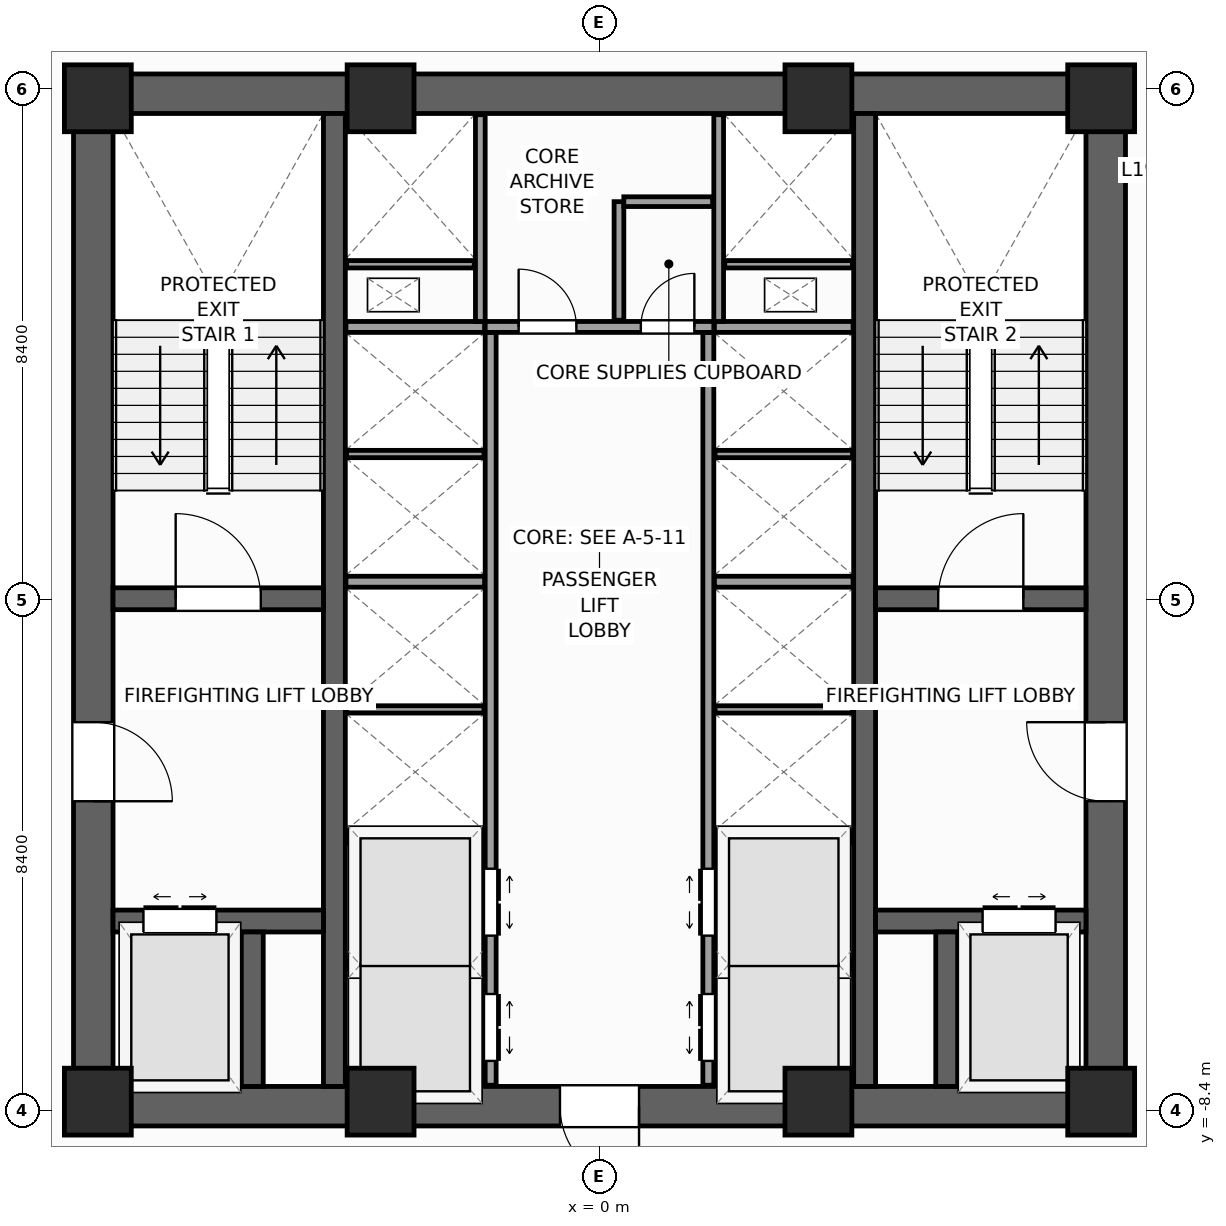
"""IFC4 building model, lengths in metres.
Left out: names, types, materials, properties, quantities, classifications, styles, units other than length and angle.
Written with IfcOpenShell. Run it as: python <this file> out.ifc"""

import sys

from ifc_helpers import new_model, si_unit, direction, frame, frame_2d, origin, origin_2d, place, context, subcontext, project, spatial, rectangle, extrude, source, transform, mapped, element, fill, save


model = new_model("IFC4")
c1 = context("Model", 3, precision=1e-05, world=origin(), true_north=direction((0.0, 1.0)))
c2 = subcontext(c1, "Body", "Model", "MODEL_VIEW")
j1 = project(units=[si_unit("LENGTHUNIT", "METRE"), si_unit("PLANEANGLEUNIT", "RADIAN")], contexts=[c1])
p1 = place(None, origin())
s1 = spatial("IfcSite", under=j1, at=p1, CompositionType="ELEMENT")
p2 = place(p1, origin())
s2 = spatial("IfcBuilding", under=s1, at=p2, CompositionType="ELEMENT")
p3 = place(p2, frame((0.0, 0.0, 83.2)))
s3 = spatial("IfcBuildingStorey", under=s2, at=p3, CompositionType="ELEMENT", Elevation=83.2)
p4 = place(p3, frame((-8.65, -8.325, 0.0), z_axis=(0.0, 0.0, 1.0), x_axis=(1.0, 0.0, 0.0)))
e1 = element("IfcWall", 1, at=p4, inside=s3, PredefinedType="SHEAR", context=c2, shape_type="SweptSolid", body=[
    extrude(rectangle(XDim=17.3, YDim=0.65, at=frame_2d((8.65, 0.0))), origin(), (0.0, 0.0, 1.0), 4.0),
])
p5 = place(p4, frame((8.0, 0.0, 0.0)))
e2 = element("IfcOpeningElement", 2, at=p5, cuts=e1, PredefinedType="OPENING", context=c2, shape_type="SweptSolid", body=[
    extrude(rectangle(XDim=1.3, YDim=2.2, at=frame_2d((0.65, 1.1))), frame((0.0, 0.335, 0.0), z_axis=(0.0, -1.0, 0.0), x_axis=(1.0, 0.0, 0.0)), (0.0, 0.0, 1.0), 0.67),
])
p6 = place(p3, frame((-8.65, 8.325, 0.0), z_axis=(0.0, 0.0, 1.0), x_axis=(1.0, 0.0, 0.0)))
e3 = element("IfcWall", 3, at=p6, inside=s3, PredefinedType="SHEAR", context=c2, shape_type="SweptSolid", body=[
    extrude(rectangle(XDim=17.3, YDim=0.65, at=frame_2d((8.65, 0.0))), origin(), (0.0, 0.0, 1.0), 4.0),
])
p7 = place(p3, frame((-8.325, -8.0, 0.0), z_axis=(0.0, 0.0, 1.0), x_axis=(0.0, 1.0, 0.0)))
e4 = element("IfcWall", 4, at=p7, inside=s3, PredefinedType="SHEAR", context=c2, shape_type="SweptSolid", body=[
    extrude(rectangle(XDim=16.0, YDim=0.65, at=frame_2d((8.0, 0.0))), origin(), (0.0, 0.0, 1.0), 4.0),
])
p8 = place(p7, frame((4.69, 0.0, 0.0)))
e5 = element("IfcOpeningElement", 5, at=p8, cuts=e4, PredefinedType="OPENING", context=c2, shape_type="SweptSolid", body=[
    extrude(rectangle(XDim=1.3, YDim=2.2, at=frame_2d((0.65, 1.1))), frame((0.0, 0.335, 0.0), z_axis=(0.0, -1.0, 0.0), x_axis=(1.0, 0.0, 0.0)), (0.0, 0.0, 1.0), 0.67),
])
p9 = place(p3, frame((8.325, -8.0, 0.0), z_axis=(0.0, 0.0, 1.0), x_axis=(0.0, 1.0, 0.0)))
e6 = element("IfcWall", 6, at=p9, inside=s3, PredefinedType="SHEAR", context=c2, shape_type="SweptSolid", body=[
    extrude(rectangle(XDim=16.0, YDim=0.65, at=frame_2d((8.0, 0.0))), origin(), (0.0, 0.0, 1.0), 4.0),
])
p10 = place(p9, frame((4.69, 0.0, 0.0)))
e7 = element("IfcOpeningElement", 7, at=p10, cuts=e6, PredefinedType="OPENING", context=c2, shape_type="SweptSolid", body=[
    extrude(rectangle(XDim=1.3, YDim=2.2, at=frame_2d((0.65, 1.1))), frame((0.0, 0.335, 0.0), z_axis=(0.0, -1.0, 0.0), x_axis=(1.0, 0.0, 0.0)), (0.0, 0.0, 1.0), 0.67),
])
for number, where, z_axis, x_axis in (
    (8, (-4.36, -8.0, 0.0), (0.0, 0.0, 1.0), (0.0, 1.0, 0.0)),
    (9, (4.36, -8.0, 0.0), (0.0, 0.0, 1.0), (0.0, 1.0, 0.0)),
):
    element("IfcWall", number, at=place(p3, frame(where, z_axis=z_axis, x_axis=x_axis)), inside=s3, PredefinedType="SHEAR", context=c2, shape_type="SweptSolid", body=[
        extrude(rectangle(XDim=16.0, YDim=0.36, at=frame_2d((8.0, 0.0))), origin(), (0.0, 0.0, 1.0), 4.0),
    ])
p11 = place(p3, frame((-8.0, 0.02, 0.0), z_axis=(0.0, 0.0, 1.0), x_axis=(1.0, 0.0, 0.0)))
e10 = element("IfcWall", 10, at=p11, inside=s3, PredefinedType="SHEAR", context=c2, shape_type="SweptSolid", body=[
    extrude(rectangle(XDim=3.46, YDim=0.36, at=frame_2d((1.73, 0.0))), origin(), (0.0, 0.0, 1.0), 4.0),
])
p12 = place(p11, frame((1.03, 0.0, 0.0)))
e11 = element("IfcOpeningElement", 11, at=p12, cuts=e10, PredefinedType="OPENING", context=c2, shape_type="SweptSolid", body=[
    extrude(rectangle(XDim=1.4, YDim=2.2, at=frame_2d((0.7, 1.1))), frame((0.0, 0.19, 0.0), z_axis=(0.0, -1.0, 0.0), x_axis=(1.0, 0.0, 0.0)), (0.0, 0.0, 1.0), 0.38),
])
p13 = place(p3, frame((4.54, 0.02, 0.0), z_axis=(0.0, 0.0, 1.0), x_axis=(1.0, 0.0, 0.0)))
e12 = element("IfcWall", 12, at=p13, inside=s3, PredefinedType="SHEAR", context=c2, shape_type="SweptSolid", body=[
    extrude(rectangle(XDim=3.46, YDim=0.36, at=frame_2d((1.73, 0.0))), origin(), (0.0, 0.0, 1.0), 4.0),
])
p14 = place(p13, frame((1.03, 0.0, 0.0)))
e13 = element("IfcOpeningElement", 13, at=p14, cuts=e12, PredefinedType="OPENING", context=c2, shape_type="SweptSolid", body=[
    extrude(rectangle(XDim=1.4, YDim=2.2, at=frame_2d((0.7, 1.1))), frame((0.0, 0.19, 0.0), z_axis=(0.0, -1.0, 0.0), x_axis=(1.0, 0.0, 0.0)), (0.0, 0.0, 1.0), 0.38),
])
p15 = place(p3, frame((-8.0, -5.28, 0.0), z_axis=(0.0, 0.0, 1.0), x_axis=(1.0, 0.0, 0.0)))
e14 = element("IfcWall", 14, at=p15, inside=s3, PredefinedType="SHEAR", context=c2, shape_type="SweptSolid", body=[
    extrude(rectangle(XDim=3.46, YDim=0.36, at=frame_2d((1.73, 0.0))), origin(), (0.0, 0.0, 1.0), 4.0),
])
p16 = place(p15, frame((0.5, 0.0, 0.0)))
e15 = element("IfcOpeningElement", 15, at=p16, cuts=e14, PredefinedType="OPENING", context=c2, shape_type="SweptSolid", body=[
    extrude(rectangle(XDim=1.2, YDim=2.25, at=frame_2d((0.6, 1.125))), frame((0.0, 0.19, 0.0), z_axis=(0.0, -1.0, 0.0), x_axis=(1.0, 0.0, 0.0)), (0.0, 0.0, 1.0), 0.38),
])
p17 = place(p3, frame((4.54, -5.28, 0.0), z_axis=(0.0, 0.0, 1.0), x_axis=(1.0, 0.0, 0.0)))
e16 = element("IfcWall", 16, at=p17, inside=s3, PredefinedType="SHEAR", context=c2, shape_type="SweptSolid", body=[
    extrude(rectangle(XDim=3.46, YDim=0.36, at=frame_2d((1.73, 0.0))), origin(), (0.0, 0.0, 1.0), 4.0),
])
p18 = place(p17, frame((1.76, 0.0, 0.0)))
e17 = element("IfcOpeningElement", 17, at=p18, cuts=e16, PredefinedType="OPENING", context=c2, shape_type="SweptSolid", body=[
    extrude(rectangle(XDim=1.2, YDim=2.25, at=frame_2d((0.6, 1.125))), frame((0.0, 0.19, 0.0), z_axis=(0.0, -1.0, 0.0), x_axis=(1.0, 0.0, 0.0)), (0.0, 0.0, 1.0), 0.38),
])
for number, where, z_axis, x_axis in (
    (18, (-5.71, -8.0, 0.0), (0.0, 0.0, 1.0), (0.0, 1.0, 0.0)),
    (19, (5.71, -8.0, 0.0), (0.0, 0.0, 1.0), (0.0, 1.0, 0.0)),
):
    element("IfcWall", number, at=place(p3, frame(where, z_axis=z_axis, x_axis=x_axis)), inside=s3, PredefinedType="SHEAR", context=c2, shape_type="SweptSolid", body=[
        extrude(rectangle(XDim=2.54, YDim=0.36, at=frame_2d((1.27, 0.0))), origin(), (0.0, 0.0, 1.0), 4.0),
    ])
m1 = source(origin(), c2, "Body", "SweptSolid", [
    extrude(rectangle(XDim=1.1, YDim=1.1, at=origin_2d()), origin(), (0.0, 0.0, 1.0), 4.0),
])
for number, where, z_axis, x_axis in (
    (20, (-8.25, -8.25, 0.0), (0.0, 0.0, 1.0), (1.0, 0.0, 0.0)),
    (21, (8.25, -8.25, 0.0), (0.0, 0.0, 1.0), (1.0, 0.0, 0.0)),
    (22, (8.25, 8.25, 0.0), (0.0, 0.0, 1.0), (1.0, 0.0, 0.0)),
    (23, (-8.25, 8.25, 0.0), (0.0, 0.0, 1.0), (1.0, 0.0, 0.0)),
    (24, (-3.6, -8.25, 0.0), (0.0, 0.0, 1.0), (1.0, 0.0, 0.0)),
    (25, (3.6, -8.25, 0.0), (0.0, 0.0, 1.0), (1.0, 0.0, 0.0)),
    (26, (-3.6, 8.25, 0.0), (0.0, 0.0, 1.0), (1.0, 0.0, 0.0)),
    (27, (3.6, 8.25, 0.0), (0.0, 0.0, 1.0), (1.0, 0.0, 0.0)),
):
    element("IfcColumn", number, at=place(p3, frame(where, z_axis=z_axis, x_axis=x_axis)), inside=s3, PredefinedType="PILASTER", context=c2, shape_type="MappedRepresentation", body=[
        mapped(m1, transform((0.0, 0.0, 0.0), scale=1.0)),
    ])
p19 = place(p3, frame((-1.79, -7.98, 0.0), z_axis=(0.0, 0.0, 1.0), x_axis=(0.0, 1.0, 0.0)))
e28 = element("IfcWall", 28, at=p19, inside=s3, PredefinedType="PARTITIONING", context=c2, shape_type="SweptSolid", body=[
    extrude(rectangle(XDim=12.38, YDim=0.18, at=frame_2d((6.19, 0.0))), origin(), (0.0, 0.0, 1.0), 3.74),
])
p20 = place(p19, frame((0.4, 0.0, 0.0)))
e29 = element("IfcOpeningElement", 29, at=p20, cuts=e28, PredefinedType="OPENING", context=c2, shape_type="SweptSolid", body=[
    extrude(rectangle(XDim=1.1, YDim=2.2, at=frame_2d((0.55, 1.1))), frame((0.0, 0.1, 0.0), z_axis=(0.0, -1.0, 0.0), x_axis=(1.0, 0.0, 0.0)), (0.0, 0.0, 1.0), 0.2),
])
p21 = place(p19, frame((2.46, 0.0, 0.0)))
e30 = element("IfcOpeningElement", 30, at=p21, cuts=e28, PredefinedType="OPENING", context=c2, shape_type="SweptSolid", body=[
    extrude(rectangle(XDim=1.1, YDim=2.2, at=frame_2d((0.55, 1.1))), frame((0.0, 0.1, 0.0), z_axis=(0.0, -1.0, 0.0), x_axis=(1.0, 0.0, 0.0)), (0.0, 0.0, 1.0), 0.2),
])
p22 = place(p3, frame((1.79, -7.98, 0.0), z_axis=(0.0, 0.0, 1.0), x_axis=(0.0, 1.0, 0.0)))
e31 = element("IfcWall", 31, at=p22, inside=s3, PredefinedType="PARTITIONING", context=c2, shape_type="SweptSolid", body=[
    extrude(rectangle(XDim=12.38, YDim=0.18, at=frame_2d((6.19, 0.0))), origin(), (0.0, 0.0, 1.0), 3.74),
])
p23 = place(p22, frame((0.4, 0.0, 0.0)))
e32 = element("IfcOpeningElement", 32, at=p23, cuts=e31, PredefinedType="OPENING", context=c2, shape_type="SweptSolid", body=[
    extrude(rectangle(XDim=1.1, YDim=2.2, at=frame_2d((0.55, 1.1))), frame((0.0, 0.1, 0.0), z_axis=(0.0, -1.0, 0.0), x_axis=(1.0, 0.0, 0.0)), (0.0, 0.0, 1.0), 0.2),
])
p24 = place(p22, frame((2.46, 0.0, 0.0)))
e33 = element("IfcOpeningElement", 33, at=p24, cuts=e31, PredefinedType="OPENING", context=c2, shape_type="SweptSolid", body=[
    extrude(rectangle(XDim=1.1, YDim=2.2, at=frame_2d((0.55, 1.1))), frame((0.0, 0.1, 0.0), z_axis=(0.0, -1.0, 0.0), x_axis=(1.0, 0.0, 0.0)), (0.0, 0.0, 1.0), 0.2),
])
p25 = place(p3, frame((-1.88, 4.49, 0.0), z_axis=(0.0, 0.0, 1.0), x_axis=(1.0, 0.0, 0.0)))
e34 = element("IfcWall", 34, at=p25, inside=s3, PredefinedType="PARTITIONING", context=c2, shape_type="SweptSolid", body=[
    extrude(rectangle(XDim=3.76, YDim=0.18, at=frame_2d((1.88, 0.0))), origin(), (0.0, 0.0, 1.0), 3.74),
])
p26 = place(p25, frame((0.55, 0.0, 0.0)))
e35 = element("IfcOpeningElement", 35, at=p26, cuts=e34, PredefinedType="OPENING", context=c2, shape_type="SweptSolid", body=[
    extrude(rectangle(XDim=0.95, YDim=2.1, at=frame_2d((0.475, 1.05))), frame((0.0, 0.1, 0.0), z_axis=(0.0, -1.0, 0.0), x_axis=(1.0, 0.0, 0.0)), (0.0, 0.0, 1.0), 0.2),
])
p27 = place(p25, frame((2.56, 0.0, 0.0)))
e36 = element("IfcOpeningElement", 36, at=p27, cuts=e34, PredefinedType="OPENING", context=c2, shape_type="SweptSolid", body=[
    extrude(rectangle(XDim=0.88, YDim=2.1, at=frame_2d((0.44, 1.05))), frame((0.0, 0.1, 0.0), z_axis=(0.0, -1.0, 0.0), x_axis=(1.0, 0.0, 0.0)), (0.0, 0.0, 1.0), 0.2),
])
for number, where, z_axis, x_axis in (
    (37, (-4.17, -3.9, 0.0), (0.0, 0.0, 1.0), (1.0, 0.0, 0.0)),
    (38, (1.89, -3.9, 0.0), (0.0, 0.0, 1.0), (1.0, 0.0, 0.0)),
    (39, (-4.17, 0.3, 0.0), (0.0, 0.0, 1.0), (1.0, 0.0, 0.0)),
    (40, (1.89, 0.3, 0.0), (0.0, 0.0, 1.0), (1.0, 0.0, 0.0)),
    (41, (-4.17, 4.49, 0.0), (0.0, 0.0, 1.0), (1.0, 0.0, 0.0)),
    (42, (1.89, 4.49, 0.0), (0.0, 0.0, 1.0), (1.0, 0.0, 0.0)),
):
    element("IfcWall", number, at=place(p3, frame(where, z_axis=z_axis, x_axis=x_axis)), inside=s3, PredefinedType="PARTITIONING", context=c2, shape_type="SweptSolid", body=[
        extrude(rectangle(XDim=2.28, YDim=0.18, at=frame_2d((1.14, 0.0))), origin(), (0.0, 0.0, 1.0), 3.74),
    ])
for number, where, z_axis, x_axis in (
    (43, (-4.16, -6.0, 0.0), (0.0, 0.0, 1.0), (1.0, 0.0, 0.0)),
    (44, (1.9, -6.0, 0.0), (0.0, 0.0, 1.0), (1.0, 0.0, 0.0)),
    (45, (-4.16, -1.8, 0.0), (0.0, 0.0, 1.0), (1.0, 0.0, 0.0)),
    (46, (1.9, -1.8, 0.0), (0.0, 0.0, 1.0), (1.0, 0.0, 0.0)),
    (47, (-4.16, 2.4, 0.0), (0.0, 0.0, 1.0), (1.0, 0.0, 0.0)),
    (48, (1.9, 2.4, 0.0), (0.0, 0.0, 1.0), (1.0, 0.0, 0.0)),
):
    element("IfcWall", number, at=place(p3, frame(where, z_axis=z_axis, x_axis=x_axis)), inside=s3, PredefinedType="PARTITIONING", context=c2, shape_type="SweptSolid", body=[
        extrude(rectangle(XDim=2.26, YDim=0.12, at=frame_2d((1.13, 0.0))), origin(), (0.0, 0.0, 1.0), 3.74),
    ])
for number, where, z_axis, x_axis in (
    (49, (-1.96, 4.58, 0.0), (0.0, 0.0, 1.0), (0.0, 1.0, 0.0)),
    (50, (1.96, 4.58, 0.0), (0.0, 0.0, 1.0), (0.0, 1.0, 0.0)),
):
    element("IfcWall", number, at=place(p3, frame(where, z_axis=z_axis, x_axis=x_axis)), inside=s3, PredefinedType="PARTITIONING", context=c2, shape_type="SweptSolid", body=[
        extrude(rectangle(XDim=3.4, YDim=0.16, at=frame_2d((1.7, 0.0))), origin(), (0.0, 0.0, 1.0), 3.74),
    ])
for number, where, z_axis, x_axis in (
    (51, (-4.16, 5.52, 0.0), (0.0, 0.0, 1.0), (1.0, 0.0, 0.0)),
    (52, (2.06, 5.52, 0.0), (0.0, 0.0, 1.0), (1.0, 0.0, 0.0)),
):
    element("IfcWall", number, at=place(p3, frame(where, z_axis=z_axis, x_axis=x_axis)), inside=s3, PredefinedType="PARTITIONING", context=c2, shape_type="SweptSolid", body=[
        extrude(rectangle(XDim=2.1, YDim=0.12, at=frame_2d((1.05, 0.0))), origin(), (0.0, 0.0, 1.0), 3.74),
    ])
p28 = place(p3, frame((0.32, 4.6, 0.0), z_axis=(0.0, 0.0, 1.0), x_axis=(0.0, 1.0, 0.0)))
e53 = element("IfcWall", 53, at=p28, inside=s3, PredefinedType="PARTITIONING", context=c2, shape_type="SweptSolid", body=[
    extrude(rectangle(XDim=1.95, YDim=0.16, at=frame_2d((0.975, 0.0))), origin(), (0.0, 0.0, 1.0), 3.74),
])
p29 = place(p3, frame((0.4, 6.55, 0.0), z_axis=(0.0, 0.0, 1.0), x_axis=(1.0, 0.0, 0.0)))
e54 = element("IfcWall", 54, at=p29, inside=s3, PredefinedType="PARTITIONING", context=c2, shape_type="SweptSolid", body=[
    extrude(rectangle(XDim=1.46, YDim=0.16, at=frame_2d((0.73, 0.0))), origin(), (0.0, 0.0, 1.0), 3.74),
])
m2 = source(origin(), c2, "Body", "SweptSolid", [
    extrude(rectangle(XDim=1.4, YDim=2.2, at=frame_2d((0.7, 1.1))), frame((0.0, 0.025, 0.0), z_axis=(0.0, -1.0, 0.0), x_axis=(1.0, 0.0, 0.0)), (0.0, 0.0, 1.0), 0.05),
])
p30 = place(p12, origin())
e55 = element("IfcDoor", 55, at=p30, inside=s3, OperationType="SINGLE_SWING_LEFT", PredefinedType="DOOR", context=c2, shape_type="MappedRepresentation", body=[
    mapped(m2, transform((0.0, 0.0, 0.0), scale=1.0)),
])
fill(e11, e55)
p31 = place(p14, origin())
e56 = element("IfcDoor", 56, at=p31, inside=s3, OperationType="SINGLE_SWING_RIGHT", PredefinedType="DOOR", context=c2, shape_type="MappedRepresentation", body=[
    mapped(m2, transform((0.0, 0.0, 0.0), scale=1.0)),
])
fill(e13, e56)
m3 = source(origin(), c2, "Body", "SweptSolid", [
    extrude(rectangle(XDim=1.3, YDim=2.2, at=frame_2d((0.65, 1.1))), frame((0.0, 0.025, 0.0), z_axis=(0.0, -1.0, 0.0), x_axis=(1.0, 0.0, 0.0)), (0.0, 0.0, 1.0), 0.05),
])
p32 = place(p8, frame((1.3, 0.0, 0.0), z_axis=(0.0, 0.0, 1.0), x_axis=(-1.0, 0.0, 0.0)))
e57 = element("IfcDoor", 57, at=p32, inside=s3, OperationType="SINGLE_SWING_LEFT", PredefinedType="DOOR", context=c2, shape_type="MappedRepresentation", body=[
    mapped(m3, transform((0.0, 0.0, 0.0), scale=1.0)),
])
fill(e5, e57)
p33 = place(p10, origin())
e58 = element("IfcDoor", 58, at=p33, inside=s3, OperationType="SINGLE_SWING_RIGHT", PredefinedType="DOOR", context=c2, shape_type="MappedRepresentation", body=[
    mapped(m3, transform((0.0, 0.0, 0.0), scale=1.0)),
])
fill(e7, e58)
p34 = place(p5, frame((1.3, 0.0, 0.0), z_axis=(0.0, 0.0, 1.0), x_axis=(-1.0, 0.0, 0.0)))
e59 = element("IfcDoor", 59, at=p34, inside=s3, OperationType="SINGLE_SWING_RIGHT", PredefinedType="DOOR", context=c2, shape_type="MappedRepresentation", body=[
    mapped(m3, transform((0.0, 0.0, 0.0), scale=1.0)),
])
fill(e2, e59)
m4 = source(origin(), c2, "Body", "SweptSolid", [
    extrude(rectangle(XDim=1.2, YDim=2.25, at=frame_2d((0.6, 1.125))), frame((0.0, 0.025, 0.0), z_axis=(0.0, -1.0, 0.0), x_axis=(1.0, 0.0, 0.0)), (0.0, 0.0, 1.0), 0.05),
])
p35 = place(p16, origin())
e60 = element("IfcDoor", 60, at=p35, inside=s3, OperationType="DOUBLE_DOOR_SLIDING", PredefinedType="DOOR", context=c2, shape_type="MappedRepresentation", body=[
    mapped(m4, transform((0.0, 0.0, 0.0), scale=1.0)),
])
fill(e15, e60)
p36 = place(p18, origin())
e61 = element("IfcDoor", 61, at=p36, inside=s3, OperationType="DOUBLE_DOOR_SLIDING", PredefinedType="DOOR", context=c2, shape_type="MappedRepresentation", body=[
    mapped(m4, transform((0.0, 0.0, 0.0), scale=1.0)),
])
fill(e17, e61)
m5 = source(origin(), c2, "Body", "SweptSolid", [
    extrude(rectangle(XDim=1.1, YDim=2.2, at=frame_2d((0.55, 1.1))), frame((0.0, 0.025, 0.0), z_axis=(0.0, -1.0, 0.0), x_axis=(1.0, 0.0, 0.0)), (0.0, 0.0, 1.0), 0.05),
])
p37 = place(p20, frame((1.1, 0.0, 0.0), z_axis=(0.0, 0.0, 1.0), x_axis=(-1.0, 0.0, 0.0)))
e62 = element("IfcDoor", 62, at=p37, inside=s3, OperationType="DOUBLE_DOOR_SLIDING", PredefinedType="DOOR", context=c2, shape_type="MappedRepresentation", body=[
    mapped(m5, transform((0.0, 0.0, 0.0), scale=1.0)),
])
fill(e29, e62)
p38 = place(p21, frame((1.1, 0.0, 0.0), z_axis=(0.0, 0.0, 1.0), x_axis=(-1.0, 0.0, 0.0)))
e63 = element("IfcDoor", 63, at=p38, inside=s3, OperationType="DOUBLE_DOOR_SLIDING", PredefinedType="DOOR", context=c2, shape_type="MappedRepresentation", body=[
    mapped(m5, transform((0.0, 0.0, 0.0), scale=1.0)),
])
fill(e30, e63)
p39 = place(p23, origin())
e64 = element("IfcDoor", 64, at=p39, inside=s3, OperationType="DOUBLE_DOOR_SLIDING", PredefinedType="DOOR", context=c2, shape_type="MappedRepresentation", body=[
    mapped(m5, transform((0.0, 0.0, 0.0), scale=1.0)),
])
fill(e32, e64)
p40 = place(p24, origin())
e65 = element("IfcDoor", 65, at=p40, inside=s3, OperationType="DOUBLE_DOOR_SLIDING", PredefinedType="DOOR", context=c2, shape_type="MappedRepresentation", body=[
    mapped(m5, transform((0.0, 0.0, 0.0), scale=1.0)),
])
fill(e33, e65)
m6 = source(origin(), c2, "Body", "SweptSolid", [
    extrude(rectangle(XDim=0.95, YDim=2.1, at=frame_2d((0.475, 1.05))), frame((0.0, 0.025, 0.0), z_axis=(0.0, -1.0, 0.0), x_axis=(1.0, 0.0, 0.0)), (0.0, 0.0, 1.0), 0.05),
])
p41 = place(p26, origin())
e66 = element("IfcDoor", 66, at=p41, inside=s3, OperationType="SINGLE_SWING_LEFT", PredefinedType="DOOR", context=c2, shape_type="MappedRepresentation", body=[
    mapped(m6, transform((0.0, 0.0, 0.0), scale=1.0)),
])
fill(e35, e66)
m7 = source(origin(), c2, "Body", "SweptSolid", [
    extrude(rectangle(XDim=0.88, YDim=2.1, at=frame_2d((0.44, 1.05))), frame((0.0, 0.025, 0.0), z_axis=(0.0, -1.0, 0.0), x_axis=(1.0, 0.0, 0.0)), (0.0, 0.0, 1.0), 0.05),
])
p42 = place(p27, origin())
e67 = element("IfcDoor", 67, at=p42, inside=s3, OperationType="SINGLE_SWING_RIGHT", PredefinedType="DOOR", context=c2, shape_type="MappedRepresentation", body=[
    mapped(m7, transform((0.0, 0.0, 0.0), scale=1.0)),
])
fill(e36, e67)
save(model, sys.argv[1])
